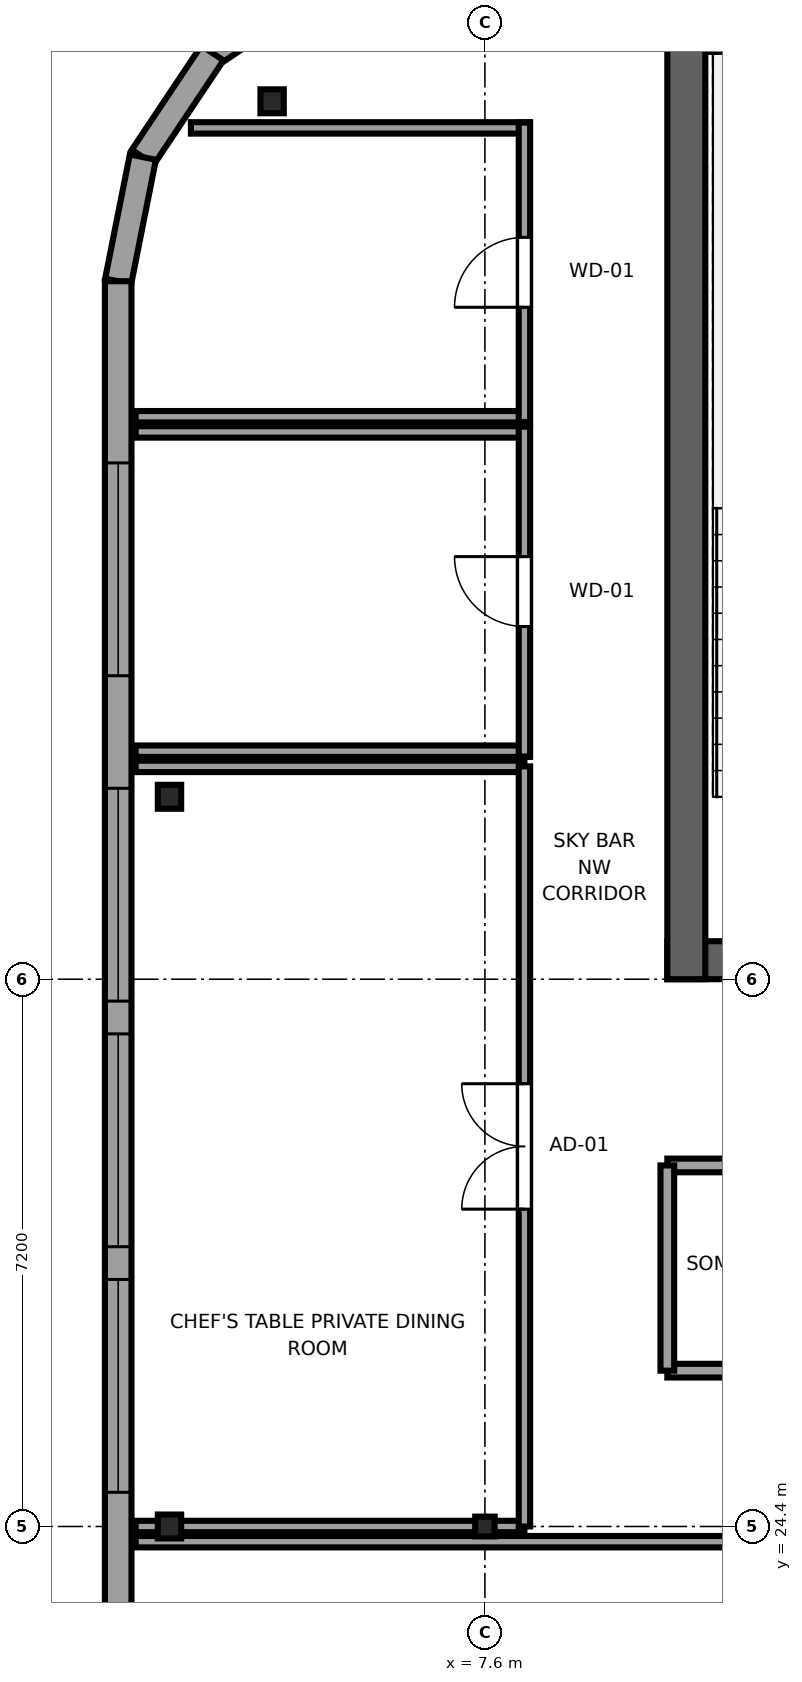
"""IFC4 building model, lengths in metres.
Left out: names, types, materials, properties, quantities, classifications, styles, units other than length and angle.
Written with IfcOpenShell. Run it as: python <this file> out.ifc"""

import sys

from ifc_helpers import new_model, si_unit, direction, frame, frame_2d, origin, origin_2d, place, context, subcontext, project, spatial, rectangle, i_section, extrude, source, transform, mapped, element, fill, save


model = new_model("IFC4")
c1 = context("Model", 3, precision=1e-05, world=origin(), true_north=direction((0.0, 1.0)))
c2 = subcontext(c1, "Body", "Model", "MODEL_VIEW")
j1 = project(units=[si_unit("LENGTHUNIT", "METRE"), si_unit("PLANEANGLEUNIT", "RADIAN")], contexts=[c1])
p1 = place(None, origin())
s1 = spatial("IfcSite", under=j1, at=p1, CompositionType="ELEMENT")
p2 = place(p1, origin())
s2 = spatial("IfcBuilding", under=s1, at=p2, CompositionType="ELEMENT")
p3 = place(p2, frame((0.0, 0.0, 286.55)))
s3 = spatial("IfcBuildingStorey", under=s2, at=p3, CompositionType="ELEMENT", Elevation=286.55)
p4 = place(p3, frame((10.0, 31.85, 0.0), z_axis=(0.0, 0.0, 1.0), x_axis=(1.0, 0.0, 0.0)))
e1 = element("IfcWall", 1, at=p4, inside=s3, PredefinedType="SHEAR", context=c2, shape_type="SweptSolid", body=[
    extrude(rectangle(XDim=26.0, YDim=0.5, at=frame_2d((13.0, 0.0))), origin(), (0.0, 0.0, 1.0), 4.4),
])
p5 = place(p4, frame((7.45, 0.0, 0.0), z_axis=(0.0, 0.0, 1.0), x_axis=(-1.0, 0.0, 0.0)))
e2 = element("IfcOpeningElement", 2, at=p5, cuts=e1, PredefinedType="OPENING", context=c2, shape_type="SweptSolid", body=[
    extrude(rectangle(XDim=1.5, YDim=2.04, at=frame_2d((0.75, 1.02))), frame((0.0, 0.26, 0.0), z_axis=(0.0, -1.0, 0.0), x_axis=(1.0, 0.0, 0.0)), (0.0, 0.0, 1.0), 0.52),
])
p6 = place(p4, frame((13.75, 0.0, 0.0), z_axis=(0.0, 0.0, 1.0), x_axis=(-1.0, 0.0, 0.0)))
e3 = element("IfcOpeningElement", 3, at=p6, cuts=e1, PredefinedType="OPENING", context=c2, shape_type="SweptSolid", body=[
    extrude(rectangle(XDim=1.5, YDim=2.04, at=frame_2d((0.75, 1.02))), frame((0.0, 0.26, 0.0), z_axis=(0.0, -1.0, 0.0), x_axis=(1.0, 0.0, 0.0)), (0.0, 0.0, 1.0), 0.52),
])
p7 = place(p4, frame((20.05, 0.0, 0.0), z_axis=(0.0, 0.0, 1.0), x_axis=(-1.0, 0.0, 0.0)))
e4 = element("IfcOpeningElement", 4, at=p7, cuts=e1, PredefinedType="OPENING", context=c2, shape_type="SweptSolid", body=[
    extrude(rectangle(XDim=1.5, YDim=2.04, at=frame_2d((0.75, 1.02))), frame((0.0, 0.26, 0.0), z_axis=(0.0, -1.0, 0.0), x_axis=(1.0, 0.0, 0.0)), (0.0, 0.0, 1.0), 0.52),
])
p8 = place(p3, frame((10.25, 31.6, 0.0), z_axis=(0.0, 0.0, 1.0), x_axis=(0.0, 1.0, 0.0)))
e5 = element("IfcWall", 5, at=p8, inside=s3, PredefinedType="SHEAR", context=c2, shape_type="SweptSolid", body=[
    extrude(rectangle(XDim=13.6, YDim=0.5, at=frame_2d((6.8, 0.0))), origin(), (0.0, 0.0, 1.0), 4.4),
])
m1 = source(origin(), c2, "Body", "SweptSolid", [
    extrude(i_section(OverallWidth=0.307, OverallDepth=0.315, WebThickness=0.012, FlangeThickness=0.019, FilletRadius=0.017, at=origin_2d()), origin(), (0.0, 0.0, 1.0), 4.4),
])
p9 = place(p3, frame((3.45, 24.4, 0.0), z_axis=(0.0, 0.0, 1.0), x_axis=(1.0, 0.0, 0.0)))
e6 = element("IfcColumn", 6, at=p9, inside=s3, PredefinedType="COLUMN", context=c2, shape_type="MappedRepresentation", body=[
    mapped(m1, transform((0.0, 0.0, 0.0), x_axis=(1.0, 0.0, 0.0), y_axis=(0.0, 1.0, 0.0), z_axis=(0.0, 0.0, 1.0), scale=1.0)),
])
m2 = source(origin(), c2, "Body", "SweptSolid", [
    extrude(i_section(OverallWidth=0.256, OverallDepth=0.26, WebThickness=0.01, FlangeThickness=0.017, FilletRadius=0.014, at=origin_2d()), origin(), (0.0, 0.0, 1.0), 4.4),
])
p10 = place(p3, frame((7.6, 24.4, 0.0), z_axis=(0.0, 0.0, 1.0), x_axis=(1.0, 0.0, 0.0)))
e7 = element("IfcColumn", 7, at=p10, inside=s3, PredefinedType="COLUMN", context=c2, shape_type="MappedRepresentation", body=[
    mapped(m2, transform((0.0, 0.0, 0.0), x_axis=(1.0, 0.0, 0.0), y_axis=(0.0, 1.0, 0.0), z_axis=(0.0, 0.0, 1.0), scale=1.0)),
])
for number, where, z_axis, x_axis in (
    (8, (4.8, 43.15, 0.0), (0.0, 0.0, 1.0), (1.0, 0.0, 0.0)),
    (9, (3.45, 34.0, 0.0), (0.0, 0.0, 1.0), (1.0, 0.0, 0.0)),
):
    element("IfcColumn", number, at=place(p3, frame(where, z_axis=z_axis, x_axis=x_axis)), inside=s3, PredefinedType="COLUMN", context=c2, shape_type="MappedRepresentation", body=[
        mapped(m1, transform((0.0, 0.0, 0.0), x_axis=(1.0, 0.0, 0.0), y_axis=(0.0, 1.0, 0.0), z_axis=(0.0, 0.0, 1.0), scale=1.0)),
    ])
for number, where, z_axis, x_axis in (
    (10, (5.385, 44.7, 0.0), (0.0, 0.0, 1.0), (-0.832, -0.556, 0.0)),
    (11, (4.015, 43.785, 0.0), (0.0, 0.0, 1.0), (-0.556, -0.831, 0.0)),
):
    element("IfcWall", number, at=place(p3, frame(where, z_axis=z_axis, x_axis=x_axis)), inside=s3, PredefinedType="SOLIDWALL", context=c2, shape_type="SweptSolid", body=[
        extrude(rectangle(XDim=1.647, YDim=0.35, at=frame_2d((0.824, 0.0))), origin(), (0.0, 0.0, 1.0), 3.67),
    ])
p11 = place(p3, frame((3.1, 42.416, 0.0), z_axis=(0.0, 0.0, 1.0), x_axis=(-0.195044345786, -0.980794424524, 0.0)))
e12 = element("IfcWall", 12, at=p11, inside=s3, PredefinedType="SOLIDWALL", context=c2, shape_type="SweptSolid", body=[
    extrude(rectangle(XDim=1.665, YDim=0.35, at=frame_2d((0.833, 0.0))), origin(), (0.0, 0.0, 1.0), 4.14),
])
p12 = place(p3, frame((2.775, 40.783, 0.0), z_axis=(0.0, 0.0, 1.0), x_axis=(0.0, -1.0, 0.0)))
e13 = element("IfcWall", 13, at=p12, inside=s3, PredefinedType="SOLIDWALL", context=c2, shape_type="SweptSolid", body=[
    extrude(rectangle(XDim=31.166, YDim=0.35, at=frame_2d((15.583, 0.0))), origin(), (0.0, 0.0, 1.0), 4.14),
])
p13 = place(p12, frame((2.39, 0.0, 0.62)))
e14 = element("IfcOpeningElement", 14, at=p13, cuts=e13, PredefinedType="OPENING", context=c2, shape_type="SweptSolid", body=[
    extrude(rectangle(XDim=2.8, YDim=2.25, at=frame_2d((1.4, 1.125))), frame((0.0, 0.185, 0.0), z_axis=(0.0, -1.0, 0.0), x_axis=(1.0, 0.0, 0.0)), (0.0, 0.0, 1.0), 0.37),
])
p14 = place(p12, frame((6.671, 0.0, 0.62)))
e15 = element("IfcOpeningElement", 15, at=p14, cuts=e13, PredefinedType="OPENING", context=c2, shape_type="SweptSolid", body=[
    extrude(rectangle(XDim=2.8, YDim=2.25, at=frame_2d((1.4, 1.125))), frame((0.0, 0.185, 0.0), z_axis=(0.0, -1.0, 0.0), x_axis=(1.0, 0.0, 0.0)), (0.0, 0.0, 1.0), 0.37),
])
p15 = place(p12, frame((9.902, 0.0, 0.62)))
e16 = element("IfcOpeningElement", 16, at=p15, cuts=e13, PredefinedType="OPENING", context=c2, shape_type="SweptSolid", body=[
    extrude(rectangle(XDim=2.8, YDim=2.25, at=frame_2d((1.4, 1.125))), frame((0.0, 0.185, 0.0), z_axis=(0.0, -1.0, 0.0), x_axis=(1.0, 0.0, 0.0)), (0.0, 0.0, 1.0), 0.37),
])
p16 = place(p12, frame((13.133, 0.0, 0.62)))
e17 = element("IfcOpeningElement", 17, at=p16, cuts=e13, PredefinedType="OPENING", context=c2, shape_type="SweptSolid", body=[
    extrude(rectangle(XDim=2.8, YDim=2.25, at=frame_2d((1.4, 1.125))), frame((0.0, 0.185, 0.0), z_axis=(0.0, -1.0, 0.0), x_axis=(1.0, 0.0, 0.0)), (0.0, 0.0, 1.0), 0.37),
])
p17 = place(p12, frame((18.464, 0.0, 0.62)))
e18 = element("IfcOpeningElement", 18, at=p17, cuts=e13, PredefinedType="OPENING", context=c2, shape_type="SweptSolid", body=[
    extrude(rectangle(XDim=2.8, YDim=2.25, at=frame_2d((1.4, 1.125))), frame((0.0, 0.185, 0.0), z_axis=(0.0, -1.0, 0.0), x_axis=(1.0, 0.0, 0.0)), (0.0, 0.0, 1.0), 0.37),
])
p18 = place(p12, frame((22.744, 0.0, 0.62)))
e19 = element("IfcOpeningElement", 19, at=p18, cuts=e13, PredefinedType="OPENING", context=c2, shape_type="SweptSolid", body=[
    extrude(rectangle(XDim=2.8, YDim=2.25, at=frame_2d((1.4, 1.125))), frame((0.0, 0.185, 0.0), z_axis=(0.0, -1.0, 0.0), x_axis=(1.0, 0.0, 0.0)), (0.0, 0.0, 1.0), 0.37),
])
p19 = place(p12, frame((27.025, 0.0, 0.62)))
e20 = element("IfcOpeningElement", 20, at=p19, cuts=e13, PredefinedType="OPENING", context=c2, shape_type="SweptSolid", body=[
    extrude(rectangle(XDim=2.8, YDim=2.25, at=frame_2d((1.4, 1.125))), frame((0.0, 0.185, 0.0), z_axis=(0.0, -1.0, 0.0), x_axis=(1.0, 0.0, 0.0)), (0.0, 0.0, 1.0), 0.37),
])
p20 = place(p3, frame((10.0, 26.45, 0.0), z_axis=(0.0, 0.0, 1.0), x_axis=(1.0, 0.0, 0.0)))
e21 = element("IfcWall", 21, at=p20, inside=s3, PredefinedType="PARTITIONING", context=c2, shape_type="SweptSolid", body=[
    extrude(rectangle(XDim=11.7, YDim=0.18, at=frame_2d((5.85, 0.0))), origin(), (0.0, 0.0, 1.0), 4.14),
])
p21 = place(p20, frame((5.025, 0.0, 0.0)))
e22 = element("IfcOpeningElement", 22, at=p21, cuts=e21, PredefinedType="OPENING", context=c2, shape_type="SweptSolid", body=[
    extrude(rectangle(XDim=1.65, YDim=2.15, at=frame_2d((0.825, 1.075))), frame((0.0, 0.1, 0.0), z_axis=(0.0, -1.0, 0.0), x_axis=(1.0, 0.0, 0.0)), (0.0, 0.0, 1.0), 0.2),
])
p22 = place(p3, frame((10.0, 29.15, 0.0), z_axis=(0.0, 0.0, 1.0), x_axis=(1.0, 0.0, 0.0)))
e23 = element("IfcWall", 23, at=p22, inside=s3, PredefinedType="PARTITIONING", context=c2, shape_type="SweptSolid", body=[
    extrude(rectangle(XDim=11.7, YDim=0.18, at=frame_2d((5.85, 0.0))), origin(), (0.0, 0.0, 1.0), 4.14),
])
p23 = place(p3, frame((10.0, 26.45, 0.0), z_axis=(0.0, 0.0, 1.0), x_axis=(0.0, 1.0, 0.0)))
e24 = element("IfcWall", 24, at=p23, inside=s3, PredefinedType="PARTITIONING", context=c2, shape_type="SweptSolid", body=[
    extrude(rectangle(XDim=2.7, YDim=0.18, at=frame_2d((1.35, 0.0))), origin(), (0.0, 0.0, 1.0), 4.14),
])
p24 = place(p3, frame((3.005, 24.2, 0.0), z_axis=(0.0, 0.0, 1.0), x_axis=(1.0, 0.0, 0.0)))
e25 = element("IfcWall", 25, at=p24, inside=s3, PredefinedType="PARTITIONING", context=c2, shape_type="SweptSolid", body=[
    extrude(rectangle(XDim=17.795, YDim=0.15, at=frame_2d((8.897, 0.0))), origin(), (0.0, 0.0, 1.0), 2.93),
])
p25 = place(p24, frame((8.073, 0.0, 0.0)))
e26 = element("IfcOpeningElement", 26, at=p25, cuts=e25, PredefinedType="OPENING", context=c2, shape_type="SweptSolid", body=[
    extrude(rectangle(XDim=1.65, YDim=2.15, at=frame_2d((0.825, 1.075))), frame((0.0, 0.085, 0.0), z_axis=(0.0, -1.0, 0.0), x_axis=(1.0, 0.0, 0.0)), (0.0, 0.0, 1.0), 0.17),
])
p26 = place(p3, frame((3.005, 24.4, 0.0), z_axis=(0.0, 0.0, 1.0), x_axis=(1.0, 0.0, 0.0)))
e27 = element("IfcWall", 27, at=p26, inside=s3, PredefinedType="PARTITIONING", context=c2, shape_type="SweptSolid", body=[
    extrude(rectangle(XDim=5.115, YDim=0.15, at=frame_2d((2.558, 0.0))), origin(), (0.0, 0.0, 1.0), 2.93),
])
p27 = place(p3, frame((3.005, 34.4, 0.0), z_axis=(0.0, 0.0, 1.0), x_axis=(1.0, 0.0, 0.0)))
e28 = element("IfcWall", 28, at=p27, inside=s3, PredefinedType="PARTITIONING", context=c2, shape_type="SweptSolid", body=[
    extrude(rectangle(XDim=5.115, YDim=0.15, at=frame_2d((2.558, 0.0))), origin(), (0.0, 0.0, 1.0), 4.14),
])
p28 = place(p3, frame((8.12, 24.4, 0.0), z_axis=(0.0, 0.0, 1.0), x_axis=(0.0, 1.0, 0.0)))
e29 = element("IfcWall", 29, at=p28, inside=s3, PredefinedType="PARTITIONING", context=c2, shape_type="SweptSolid", body=[
    extrude(rectangle(XDim=10.0, YDim=0.15, at=frame_2d((5.0, 0.0))), origin(), (0.0, 0.0, 1.0), 4.14),
])
p29 = place(p28, frame((4.175, 0.0, 0.0)))
e30 = element("IfcOpeningElement", 30, at=p29, cuts=e29, PredefinedType="OPENING", context=c2, shape_type="SweptSolid", body=[
    extrude(rectangle(XDim=1.65, YDim=2.15, at=frame_2d((0.825, 1.075))), frame((0.0, 0.085, 0.0), z_axis=(0.0, -1.0, 0.0), x_axis=(1.0, 0.0, 0.0)), (0.0, 0.0, 1.0), 0.17),
])
for number, where, z_axis, x_axis in (
    (31, (3.005, 34.6, 0.0), (0.0, 0.0, 1.0), (1.0, 0.0, 0.0)),
    (32, (3.005, 38.8, 0.0), (0.0, 0.0, 1.0), (1.0, 0.0, 0.0)),
):
    element("IfcWall", number, at=place(p3, frame(where, z_axis=z_axis, x_axis=x_axis)), inside=s3, PredefinedType="PARTITIONING", context=c2, shape_type="SweptSolid", body=[
        extrude(rectangle(XDim=5.185, YDim=0.15, at=frame_2d((2.593, 0.0))), origin(), (0.0, 0.0, 1.0), 4.14),
    ])
p30 = place(p3, frame((8.12, 34.53, 0.0), z_axis=(0.0, 0.0, 1.0), x_axis=(0.0, 1.0, 0.0)))
e33 = element("IfcWall", 33, at=p30, inside=s3, PredefinedType="PARTITIONING", context=c2, shape_type="SweptSolid", body=[
    extrude(rectangle(XDim=4.34, YDim=0.15, at=frame_2d((2.17, 0.0))), origin(), (0.0, 0.0, 1.0), 4.14),
])
p31 = place(p30, frame((1.71, 0.0, 0.0)))
e34 = element("IfcOpeningElement", 34, at=p31, cuts=e33, PredefinedType="OPENING", context=c2, shape_type="SweptSolid", body=[
    extrude(rectangle(XDim=0.92, YDim=2.01, at=frame_2d((0.46, 1.005))), frame((0.0, 0.085, 0.0), z_axis=(0.0, -1.0, 0.0), x_axis=(1.0, 0.0, 0.0)), (0.0, 0.0, 1.0), 0.17),
])
p32 = place(p3, frame((3.005, 39.0, 0.0), z_axis=(0.0, 0.0, 1.0), x_axis=(1.0, 0.0, 0.0)))
e35 = element("IfcWall", 35, at=p32, inside=s3, PredefinedType="PARTITIONING", context=c2, shape_type="SweptSolid", body=[
    extrude(rectangle(XDim=5.185, YDim=0.15, at=frame_2d((2.593, 0.0))), origin(), (0.0, 0.0, 1.0), 4.14),
])
p33 = place(p3, frame((3.732, 42.8, 0.0), z_axis=(0.0, 0.0, 1.0), x_axis=(1.0, 0.0, 0.0)))
e36 = element("IfcWall", 36, at=p33, inside=s3, PredefinedType="PARTITIONING", context=c2, shape_type="SweptSolid", body=[
    extrude(rectangle(XDim=4.458, YDim=0.15, at=frame_2d((2.229, 0.0))), origin(), (0.0, 0.0, 1.0), 2.93),
])
p34 = place(p3, frame((8.12, 38.93, 0.0), z_axis=(0.0, 0.0, 1.0), x_axis=(0.0, 1.0, 0.0)))
e37 = element("IfcWall", 37, at=p34, inside=s3, PredefinedType="PARTITIONING", context=c2, shape_type="SweptSolid", body=[
    extrude(rectangle(XDim=3.94, YDim=0.15, at=frame_2d((1.97, 0.0))), origin(), (0.0, 0.0, 1.0), 4.14),
])
p35 = place(p34, frame((1.51, 0.0, 0.0)))
e38 = element("IfcOpeningElement", 38, at=p35, cuts=e37, PredefinedType="OPENING", context=c2, shape_type="SweptSolid", body=[
    extrude(rectangle(XDim=0.92, YDim=2.01, at=frame_2d((0.46, 1.005))), frame((0.0, 0.085, 0.0), z_axis=(0.0, -1.0, 0.0), x_axis=(1.0, 0.0, 0.0)), (0.0, 0.0, 1.0), 0.17),
])
m3 = source(origin(), c2, "Body", "SweptSolid", [
    extrude(rectangle(XDim=2.8, YDim=2.25, at=frame_2d((1.4, 1.125))), frame((0.0, 0.09, 0.0), z_axis=(0.0, -1.0, 0.0), x_axis=(1.0, 0.0, 0.0)), (0.0, 0.0, 1.0), 0.06),
])
p36 = place(p13, origin())
e39 = element("IfcWindow", 39, at=p36, inside=s3, PartitioningType="TRIPLE_PANEL_HORIZONTAL", PredefinedType="WINDOW", context=c2, shape_type="MappedRepresentation", body=[
    mapped(m3, transform((0.0, 0.0, 0.0), x_axis=(1.0, 0.0, 0.0), y_axis=(0.0, 1.0, 0.0), z_axis=(0.0, 0.0, 1.0), scale=1.0)),
])
fill(e14, e39)
p37 = place(p14, origin())
e40 = element("IfcWindow", 40, at=p37, inside=s3, PartitioningType="TRIPLE_PANEL_HORIZONTAL", PredefinedType="WINDOW", context=c2, shape_type="MappedRepresentation", body=[
    mapped(m3, transform((0.0, 0.0, 0.0), x_axis=(1.0, 0.0, 0.0), y_axis=(0.0, 1.0, 0.0), z_axis=(0.0, 0.0, 1.0), scale=1.0)),
])
fill(e15, e40)
p38 = place(p15, origin())
e41 = element("IfcWindow", 41, at=p38, inside=s3, PartitioningType="TRIPLE_PANEL_HORIZONTAL", PredefinedType="WINDOW", context=c2, shape_type="MappedRepresentation", body=[
    mapped(m3, transform((0.0, 0.0, 0.0), x_axis=(1.0, 0.0, 0.0), y_axis=(0.0, 1.0, 0.0), z_axis=(0.0, 0.0, 1.0), scale=1.0)),
])
fill(e16, e41)
p39 = place(p16, origin())
e42 = element("IfcWindow", 42, at=p39, inside=s3, PartitioningType="TRIPLE_PANEL_HORIZONTAL", PredefinedType="WINDOW", context=c2, shape_type="MappedRepresentation", body=[
    mapped(m3, transform((0.0, 0.0, 0.0), x_axis=(1.0, 0.0, 0.0), y_axis=(0.0, 1.0, 0.0), z_axis=(0.0, 0.0, 1.0), scale=1.0)),
])
fill(e17, e42)
m4 = source(origin(), c2, "Body", "SweptSolid", [
    extrude(rectangle(XDim=1.65, YDim=2.15, at=frame_2d((0.825, 1.075))), frame((0.0, 0.025, 0.0), z_axis=(0.0, -1.0, 0.0), x_axis=(1.0, 0.0, 0.0)), (0.0, 0.0, 1.0), 0.05),
])
p40 = place(p29, origin())
e43 = element("IfcDoor", 43, at=p40, inside=s3, OperationType="DOUBLE_DOOR_SINGLE_SWING", PredefinedType="DOOR", context=c2, shape_type="MappedRepresentation", body=[
    mapped(m4, transform((0.0, 0.0, 0.0), x_axis=(1.0, 0.0, 0.0), y_axis=(0.0, 1.0, 0.0), z_axis=(0.0, 0.0, 1.0), scale=1.0)),
])
fill(e30, e43)
m5 = source(origin(), c2, "Body", "SweptSolid", [
    extrude(rectangle(XDim=0.92, YDim=2.01, at=frame_2d((0.46, 1.005))), frame((0.0, 0.025, 0.0), z_axis=(0.0, -1.0, 0.0), x_axis=(1.0, 0.0, 0.0)), (0.0, 0.0, 1.0), 0.05),
])
p41 = place(p31, origin())
e44 = element("IfcDoor", 44, at=p41, inside=s3, OperationType="SINGLE_SWING_RIGHT", PredefinedType="DOOR", context=c2, shape_type="MappedRepresentation", body=[
    mapped(m5, transform((0.0, 0.0, 0.0), x_axis=(1.0, 0.0, 0.0), y_axis=(0.0, 1.0, 0.0), z_axis=(0.0, 0.0, 1.0), scale=1.0)),
])
fill(e34, e44)
p42 = place(p35, origin())
e45 = element("IfcDoor", 45, at=p42, inside=s3, OperationType="SINGLE_SWING_LEFT", PredefinedType="DOOR", context=c2, shape_type="MappedRepresentation", body=[
    mapped(m5, transform((0.0, 0.0, 0.0), x_axis=(1.0, 0.0, 0.0), y_axis=(0.0, 1.0, 0.0), z_axis=(0.0, 0.0, 1.0), scale=1.0)),
])
fill(e38, e45)
save(model, sys.argv[1])
